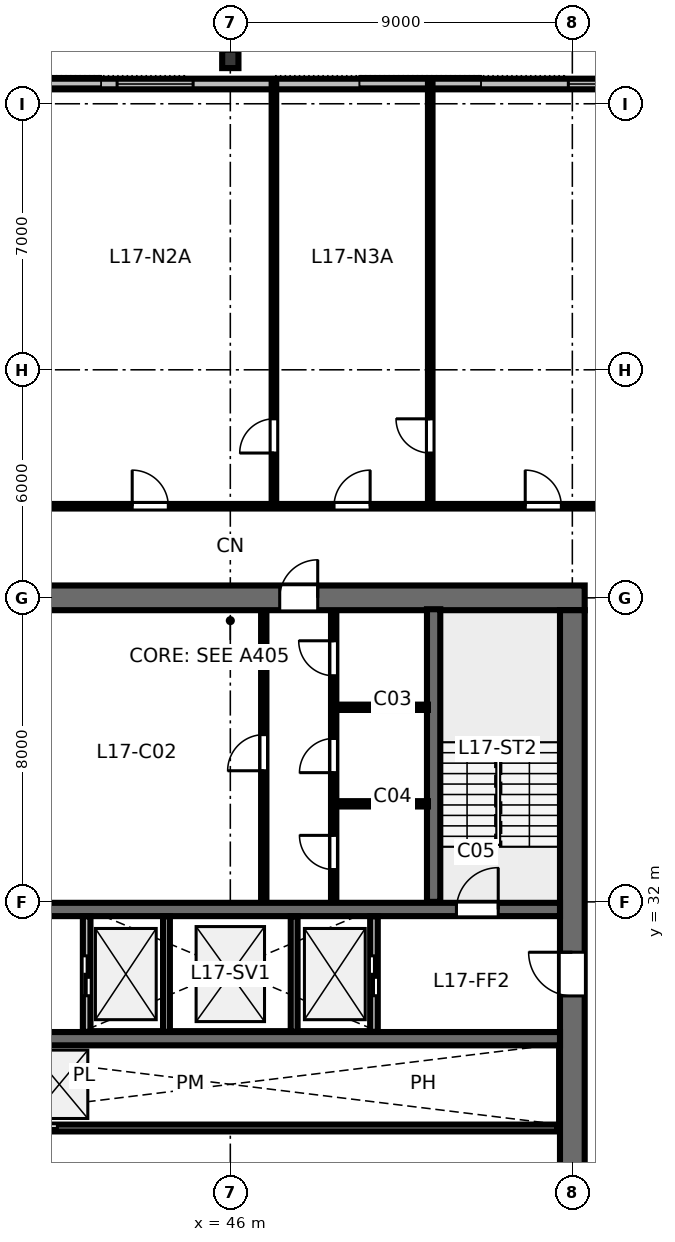
"""IFC4 building model, lengths in metres.
Left out: names, types, materials, properties, quantities, classifications, styles, units other than length and angle.
Written with IfcOpenShell. Run it as: python <this file> out.ifc"""

import sys

from ifc_helpers import new_model, si_unit, direction, frame, frame_2d, origin, origin_2d, place, context, subcontext, project, spatial, rectangle, i_section, extrude, element, fill, save


model = new_model("IFC4")
c1 = context("Model", 3, precision=1e-05, world=origin(), true_north=direction((0.0, 1.0)))
c2 = subcontext(c1, "Body", "Model", "MODEL_VIEW")
j1 = project(units=[si_unit("LENGTHUNIT", "METRE"), si_unit("PLANEANGLEUNIT", "RADIAN")], contexts=[c1])
p1 = place(None, origin())
s1 = spatial("IfcSite", under=j1, at=p1, CompositionType="ELEMENT")
p2 = place(p1, origin())
s2 = spatial("IfcBuilding", under=s1, at=p2, CompositionType="ELEMENT")
p3 = place(p2, frame((0.0, 0.0, 67.6)))
s3 = spatial("IfcBuildingStorey", under=s2, at=p3, CompositionType="ELEMENT", Elevation=67.6)
p4 = place(p3, frame((36.675, 40.0, 0.0), z_axis=(0.0, 0.0, 1.0), x_axis=(1.0, 0.0, 0.0)))
e1 = element("IfcWall", 1, at=p4, inside=s3, PredefinedType="SHEAR", context=c2, shape_type="SweptSolid", body=[
    extrude(rectangle(XDim=18.65, YDim=0.65, at=frame_2d((9.325, 0.0))), origin(), (0.0, 0.0, 1.0), 3.36),
])
p5 = place(p4, frame((10.625, 0.0, 0.0)))
e2 = element("IfcOpeningElement", 2, at=p5, cuts=e1, PredefinedType="OPENING", context=c2, shape_type="SweptSolid", body=[
    extrude(rectangle(XDim=1.0, YDim=2.15, at=frame_2d((0.5, 1.075))), frame((0.0, 0.335, 0.0), z_axis=(0.0, -1.0, 0.0), x_axis=(1.0, 0.0, 0.0)), (0.0, 0.0, 1.0), 0.67),
])
p6 = place(p3, frame((55.0, 24.325, 0.0), z_axis=(0.0, 0.0, 1.0), x_axis=(0.0, 1.0, 0.0)))
e3 = element("IfcWall", 3, at=p6, inside=s3, PredefinedType="SHEAR", context=c2, shape_type="SweptSolid", body=[
    extrude(rectangle(XDim=15.35, YDim=0.65, at=frame_2d((7.675, 0.0))), origin(), (0.0, 0.0, 1.0), 3.36),
])
p7 = place(p6, frame((5.2, 0.0, 0.0)))
e4 = element("IfcOpeningElement", 4, at=p7, cuts=e3, PredefinedType="OPENING", context=c2, shape_type="SweptSolid", body=[
    extrude(rectangle(XDim=1.15, YDim=2.15, at=frame_2d((0.575, 1.075))), frame((0.0, 0.335, 0.0), z_axis=(0.0, -1.0, 0.0), x_axis=(1.0, 0.0, 0.0)), (0.0, 0.0, 1.0), 0.67),
])
p8 = place(p3, frame((37.325, 31.8, 0.0), z_axis=(0.0, 0.0, 1.0), x_axis=(1.0, 0.0, 0.0)))
e5 = element("IfcWall", 5, at=p8, inside=s3, PredefinedType="SHEAR", context=c2, shape_type="SweptSolid", body=[
    extrude(rectangle(XDim=17.35, YDim=0.35, at=frame_2d((8.675, 0.0))), origin(), (0.0, 0.0, 1.0), 3.36),
])
p9 = place(p8, frame((0.725, 0.0, 0.0)))
e6 = element("IfcOpeningElement", 6, at=p9, cuts=e5, PredefinedType="OPENING", context=c2, shape_type="SweptSolid", body=[
    extrude(rectangle(XDim=1.1, YDim=2.15, at=frame_2d((0.55, 1.075))), frame((0.0, 0.185, 0.0), z_axis=(0.0, -1.0, 0.0), x_axis=(1.0, 0.0, 0.0)), (0.0, 0.0, 1.0), 0.37),
])
p10 = place(p8, frame((14.625, 0.0, 0.0)))
e7 = element("IfcOpeningElement", 7, at=p10, cuts=e5, PredefinedType="OPENING", context=c2, shape_type="SweptSolid", body=[
    extrude(rectangle(XDim=1.1, YDim=2.15, at=frame_2d((0.55, 1.075))), frame((0.0, 0.185, 0.0), z_axis=(0.0, -1.0, 0.0), x_axis=(1.0, 0.0, 0.0)), (0.0, 0.0, 1.0), 0.37),
])
p11 = place(p3, frame((37.325, 28.4, 0.0), z_axis=(0.0, 0.0, 1.0), x_axis=(1.0, 0.0, 0.0)))
e8 = element("IfcWall", 8, at=p11, inside=s3, PredefinedType="SHEAR", context=c2, shape_type="SweptSolid", body=[
    extrude(rectangle(XDim=17.35, YDim=0.35, at=frame_2d((8.675, 0.0))), origin(), (0.0, 0.0, 1.0), 3.36),
])
p12 = place(p3, frame((46.0, 54.18, 0.0), z_axis=(0.0, 0.089001216718, 0.996031517284), x_axis=(-1.0, 0.0, 0.0)))
e9 = element("IfcColumn", 9, at=p12, inside=s3, PredefinedType="COLUMN", context=c2, shape_type="SweptSolid", body=[
    extrude(i_section(OverallWidth=0.428, OverallDepth=0.483, WebThickness=0.051, FlangeThickness=0.082, FilletRadius=0.025, at=origin_2d()), origin(), (0.0, 0.0, 1.0), 3.371),
])
p13 = place(p3, frame((66.89, 53.52, 0.0), z_axis=(0.0, 0.0, 1.0), x_axis=(-1.0, 0.0, 0.0)))
e10 = element("IfcWall", 10, at=p13, inside=s3, PredefinedType="STANDARD", context=c2, shape_type="SweptSolid", body=[
    extrude(rectangle(XDim=41.78, YDim=0.28, at=frame_2d((20.89, 0.0))), origin(), (0.0, 0.0, 1.0), 3.36),
])
p14 = place(p13, frame((2.079, 0.0, 0.8)))
e11 = element("IfcOpeningElement", 11, at=p14, cuts=e10, PredefinedType="OPENING", context=c2, shape_type="SweptSolid", body=[
    extrude(rectangle(XDim=2.0, YDim=1.95, at=frame_2d((1.0, 0.975))), frame((0.0, 0.15, 0.0), z_axis=(0.0, -1.0, 0.0), x_axis=(1.0, 0.0, 0.0)), (0.0, 0.0, 1.0), 0.3),
])
p15 = place(p13, frame((6.037, 0.0, 0.8)))
e12 = element("IfcOpeningElement", 12, at=p15, cuts=e10, PredefinedType="OPENING", context=c2, shape_type="SweptSolid", body=[
    extrude(rectangle(XDim=2.0, YDim=1.95, at=frame_2d((1.0, 0.975))), frame((0.0, 0.15, 0.0), z_axis=(0.0, -1.0, 0.0), x_axis=(1.0, 0.0, 0.0)), (0.0, 0.0, 1.0), 0.3),
])
p16 = place(p13, frame((9.995, 0.0, 0.8)))
e13 = element("IfcOpeningElement", 13, at=p16, cuts=e10, PredefinedType="OPENING", context=c2, shape_type="SweptSolid", body=[
    extrude(rectangle(XDim=2.0, YDim=1.95, at=frame_2d((1.0, 0.975))), frame((0.0, 0.15, 0.0), z_axis=(0.0, -1.0, 0.0), x_axis=(1.0, 0.0, 0.0)), (0.0, 0.0, 1.0), 0.3),
])
p17 = place(p13, frame((21.869, 0.0, 0.8)))
e14 = element("IfcOpeningElement", 14, at=p17, cuts=e10, PredefinedType="OPENING", context=c2, shape_type="SweptSolid", body=[
    extrude(rectangle(XDim=2.0, YDim=1.95, at=frame_2d((1.0, 0.975))), frame((0.0, 0.15, 0.0), z_axis=(0.0, -1.0, 0.0), x_axis=(1.0, 0.0, 0.0)), (0.0, 0.0, 1.0), 0.3),
])
p18 = place(p13, frame((29.785, 0.0, 0.8)))
e15 = element("IfcOpeningElement", 15, at=p18, cuts=e10, PredefinedType="OPENING", context=c2, shape_type="SweptSolid", body=[
    extrude(rectangle(XDim=2.0, YDim=1.95, at=frame_2d((1.0, 0.975))), frame((0.0, 0.15, 0.0), z_axis=(0.0, -1.0, 0.0), x_axis=(1.0, 0.0, 0.0)), (0.0, 0.0, 1.0), 0.3),
])
p19 = place(p13, frame((33.743, 0.0, 0.8)))
e16 = element("IfcOpeningElement", 16, at=p19, cuts=e10, PredefinedType="OPENING", context=c2, shape_type="SweptSolid", body=[
    extrude(rectangle(XDim=2.0, YDim=1.95, at=frame_2d((1.0, 0.975))), frame((0.0, 0.15, 0.0), z_axis=(0.0, -1.0, 0.0), x_axis=(1.0, 0.0, 0.0)), (0.0, 0.0, 1.0), 0.3),
])
p20 = place(p13, frame((37.701, 0.0, 0.8)))
e17 = element("IfcOpeningElement", 17, at=p20, cuts=e10, PredefinedType="OPENING", context=c2, shape_type="SweptSolid", body=[
    extrude(rectangle(XDim=2.0, YDim=1.95, at=frame_2d((1.0, 0.975))), frame((0.0, 0.15, 0.0), z_axis=(0.0, -1.0, 0.0), x_axis=(1.0, 0.0, 0.0)), (0.0, 0.0, 1.0), 0.3),
])
p21 = place(p3, frame((51.35, 32.0, 0.0), z_axis=(0.0, 0.0, 1.0), x_axis=(0.0, 1.0, 0.0)))
e18 = element("IfcWall", 18, at=p21, inside=s3, PredefinedType="SHEAR", context=c2, shape_type="SweptSolid", body=[
    extrude(rectangle(XDim=7.7, YDim=0.35, at=frame_2d((3.85, 0.0))), origin(), (0.0, 0.0, 1.0), 3.6),
])
p22 = place(p3, frame((46.88, 32.05, 0.0), z_axis=(0.0, 0.0, 1.0), x_axis=(0.0, 1.0, 0.0)))
e19 = element("IfcWall", 19, at=p22, inside=s3, PredefinedType="PARTITIONING", context=c2, shape_type="SweptSolid", body=[
    extrude(rectangle(XDim=7.6, YDim=0.14, at=frame_2d((3.8, 0.0))), origin(), (0.0, 0.0, 1.0), 3.36),
])
p23 = place(p22, frame((3.4, 0.0, 0.0)))
e20 = element("IfcOpeningElement", 20, at=p23, cuts=e19, PredefinedType="OPENING", context=c2, shape_type="SweptSolid", body=[
    extrude(rectangle(XDim=0.95, YDim=2.15, at=frame_2d((0.475, 1.075))), frame((0.0, 0.08, 0.0), z_axis=(0.0, -1.0, 0.0), x_axis=(1.0, 0.0, 0.0)), (0.0, 0.0, 1.0), 0.16),
])
p24 = place(p3, frame((48.72, 32.05, 0.0), z_axis=(0.0, 0.0, 1.0), x_axis=(0.0, 1.0, 0.0)))
e21 = element("IfcWall", 21, at=p24, inside=s3, PredefinedType="PARTITIONING", context=c2, shape_type="SweptSolid", body=[
    extrude(rectangle(XDim=7.6, YDim=0.14, at=frame_2d((3.8, 0.0))), origin(), (0.0, 0.0, 1.0), 3.36),
])
p25 = place(p24, frame((0.8, 0.0, 0.0)))
e22 = element("IfcOpeningElement", 22, at=p25, cuts=e21, PredefinedType="OPENING", context=c2, shape_type="SweptSolid", body=[
    extrude(rectangle(XDim=0.9, YDim=2.15, at=frame_2d((0.45, 1.075))), frame((0.0, 0.08, 0.0), z_axis=(0.0, -1.0, 0.0), x_axis=(1.0, 0.0, 0.0)), (0.0, 0.0, 1.0), 0.16),
])
p26 = place(p24, frame((3.35, 0.0, 0.0)))
e23 = element("IfcOpeningElement", 23, at=p26, cuts=e21, PredefinedType="OPENING", context=c2, shape_type="SweptSolid", body=[
    extrude(rectangle(XDim=0.9, YDim=2.15, at=frame_2d((0.45, 1.075))), frame((0.0, 0.08, 0.0), z_axis=(0.0, -1.0, 0.0), x_axis=(1.0, 0.0, 0.0)), (0.0, 0.0, 1.0), 0.16),
])
p27 = place(p24, frame((5.9, 0.0, 0.0)))
e24 = element("IfcOpeningElement", 24, at=p27, cuts=e21, PredefinedType="OPENING", context=c2, shape_type="SweptSolid", body=[
    extrude(rectangle(XDim=0.92, YDim=2.15, at=frame_2d((0.46, 1.075))), frame((0.0, 0.08, 0.0), z_axis=(0.0, -1.0, 0.0), x_axis=(1.0, 0.0, 0.0)), (0.0, 0.0, 1.0), 0.16),
])
for number, where, z_axis, x_axis in (
    (25, (48.8, 34.58, 0.0), (0.0, 0.0, 1.0), (1.0, 0.0, 0.0)),
    (26, (48.8, 37.12, 0.0), (0.0, 0.0, 1.0), (1.0, 0.0, 0.0)),
):
    element("IfcWall", number, at=place(p3, frame(where, z_axis=z_axis, x_axis=x_axis)), inside=s3, PredefinedType="PARTITIONING", context=c2, shape_type="SweptSolid", body=[
        extrude(rectangle(XDim=2.4, YDim=0.14, at=frame_2d((1.2, 0.0))), origin(), (0.0, 0.0, 1.0), 3.36),
    ])
p28 = place(p3, frame((42.22, 28.58, 0.0), z_axis=(0.0, 0.0, 1.0), x_axis=(0.0, 1.0, 0.0)))
e27 = element("IfcWall", 27, at=p28, inside=s3, PredefinedType="PARTITIONING", context=c2, shape_type="SweptSolid", body=[
    extrude(rectangle(XDim=3.04, YDim=0.2, at=frame_2d((1.52, 0.0))), origin(), (0.0, 0.0, 1.0), 3.36),
])
p29 = place(p28, frame((0.95, 0.0, 0.0)))
e28 = element("IfcOpeningElement", 28, at=p29, cuts=e27, PredefinedType="OPENING", context=c2, shape_type="SweptSolid", body=[
    extrude(rectangle(XDim=1.05, YDim=2.15, at=frame_2d((0.525, 1.075))), frame((0.0, 0.11, 0.0), z_axis=(0.0, -1.0, 0.0), x_axis=(1.0, 0.0, 0.0)), (0.0, 0.0, 1.0), 0.22),
])
p30 = place(p3, frame((49.78, 28.58, 0.0), z_axis=(0.0, 0.0, 1.0), x_axis=(0.0, 1.0, 0.0)))
e29 = element("IfcWall", 29, at=p30, inside=s3, PredefinedType="PARTITIONING", context=c2, shape_type="SweptSolid", body=[
    extrude(rectangle(XDim=3.04, YDim=0.2, at=frame_2d((1.52, 0.0))), origin(), (0.0, 0.0, 1.0), 3.36),
])
p31 = place(p30, frame((0.95, 0.0, 0.0)))
e30 = element("IfcOpeningElement", 30, at=p31, cuts=e29, PredefinedType="OPENING", context=c2, shape_type="SweptSolid", body=[
    extrude(rectangle(XDim=1.05, YDim=2.15, at=frame_2d((0.525, 1.075))), frame((0.0, 0.11, 0.0), z_axis=(0.0, -1.0, 0.0), x_axis=(1.0, 0.0, 0.0)), (0.0, 0.0, 1.0), 0.22),
])
for number, where, z_axis, x_axis in (
    (31, (44.32, 28.58, 0.0), (0.0, 0.0, 1.0), (0.0, 1.0, 0.0)),
    (32, (47.68, 28.58, 0.0), (0.0, 0.0, 1.0), (0.0, 1.0, 0.0)),
):
    element("IfcWall", number, at=place(p3, frame(where, z_axis=z_axis, x_axis=x_axis)), inside=s3, PredefinedType="PARTITIONING", context=c2, shape_type="SweptSolid", body=[
        extrude(rectangle(XDim=3.04, YDim=0.18, at=frame_2d((1.52, 0.0))), origin(), (0.0, 0.0, 1.0), 3.36),
    ])
p32 = place(p3, frame((37.4, 26.05, 0.0), z_axis=(0.0, 0.0, 1.0), x_axis=(1.0, 0.0, 0.0)))
e33 = element("IfcWall", 33, at=p32, inside=s3, PredefinedType="PARTITIONING", context=c2, shape_type="SweptSolid", body=[
    extrude(rectangle(XDim=17.2, YDim=0.18, at=frame_2d((8.6, 0.0))), origin(), (0.0, 0.0, 1.0), 3.36),
])
p33 = place(p32, frame((1.1, 0.0, 0.0)))
e34 = element("IfcOpeningElement", 34, at=p33, cuts=e33, PredefinedType="OPENING", context=c2, shape_type="SweptSolid", body=[
    extrude(rectangle(XDim=1.05, YDim=2.15, at=frame_2d((0.525, 1.075))), frame((0.0, 0.1, 0.0), z_axis=(0.0, -1.0, 0.0), x_axis=(1.0, 0.0, 0.0)), (0.0, 0.0, 1.0), 0.2),
])
p34 = place(p32, frame((3.0, 0.0, 0.0)))
e35 = element("IfcOpeningElement", 35, at=p34, cuts=e33, PredefinedType="OPENING", context=c2, shape_type="SweptSolid", body=[
    extrude(rectangle(XDim=1.05, YDim=2.15, at=frame_2d((0.525, 1.075))), frame((0.0, 0.1, 0.0), z_axis=(0.0, -1.0, 0.0), x_axis=(1.0, 0.0, 0.0)), (0.0, 0.0, 1.0), 0.2),
])
p35 = place(p3, frame((47.148, 42.41, 0.0), z_axis=(0.0, 0.0, 1.0), x_axis=(0.0, 1.0, 0.0)))
e36 = element("IfcWall", 36, at=p35, inside=s3, PredefinedType="PARTITIONING", context=c2, shape_type="SweptSolid", body=[
    extrude(rectangle(XDim=11.11, YDim=0.12, at=frame_2d((5.555, 0.0))), origin(), (0.0, 0.0, 1.0), 2.64),
])
p36 = place(p35, frame((1.4, 0.0, 0.0)))
e37 = element("IfcOpeningElement", 37, at=p36, cuts=e36, PredefinedType="OPENING", context=c2, shape_type="SweptSolid", body=[
    extrude(rectangle(XDim=0.9, YDim=2.15, at=frame_2d((0.45, 1.075))), frame((0.0, 0.07, 0.0), z_axis=(0.0, -1.0, 0.0), x_axis=(1.0, 0.0, 0.0)), (0.0, 0.0, 1.0), 0.14),
])
p37 = place(p3, frame((51.261, 42.41, 0.0), z_axis=(0.0, 0.0, 1.0), x_axis=(0.0, 1.0, 0.0)))
e38 = element("IfcWall", 38, at=p37, inside=s3, PredefinedType="PARTITIONING", context=c2, shape_type="SweptSolid", body=[
    extrude(rectangle(XDim=11.11, YDim=0.12, at=frame_2d((5.555, 0.0))), origin(), (0.0, 0.0, 1.0), 2.64),
])
p38 = place(p37, frame((1.4, 0.0, 0.0)))
e39 = element("IfcOpeningElement", 39, at=p38, cuts=e38, PredefinedType="OPENING", context=c2, shape_type="SweptSolid", body=[
    extrude(rectangle(XDim=0.9, YDim=2.15, at=frame_2d((0.45, 1.075))), frame((0.0, 0.07, 0.0), z_axis=(0.0, -1.0, 0.0), x_axis=(1.0, 0.0, 0.0)), (0.0, 0.0, 1.0), 0.14),
])
p39 = place(p3, frame((34.65, 42.41, 0.0), z_axis=(0.0, 0.0, 1.0), x_axis=(1.0, 0.0, 0.0)))
e40 = element("IfcWall", 40, at=p39, inside=s3, PredefinedType="PARTITIONING", context=c2, shape_type="SweptSolid", body=[
    extrude(rectangle(XDim=22.7, YDim=0.12, at=frame_2d((11.35, 0.0))), origin(), (0.0, 0.0, 1.0), 2.64),
])
p40 = place(p39, frame((2.59, 0.0, 0.0)))
e41 = element("IfcOpeningElement", 41, at=p40, cuts=e40, PredefinedType="OPENING", context=c2, shape_type="SweptSolid", body=[
    extrude(rectangle(XDim=0.95, YDim=2.15, at=frame_2d((0.475, 1.075))), frame((0.0, 0.07, 0.0), z_axis=(0.0, -1.0, 0.0), x_axis=(1.0, 0.0, 0.0)), (0.0, 0.0, 1.0), 0.14),
])
p41 = place(p39, frame((8.768, 0.0, 0.0)))
e42 = element("IfcOpeningElement", 42, at=p41, cuts=e40, PredefinedType="OPENING", context=c2, shape_type="SweptSolid", body=[
    extrude(rectangle(XDim=0.95, YDim=2.15, at=frame_2d((0.475, 1.075))), frame((0.0, 0.07, 0.0), z_axis=(0.0, -1.0, 0.0), x_axis=(1.0, 0.0, 0.0)), (0.0, 0.0, 1.0), 0.14),
])
p42 = place(p39, frame((14.079, 0.0, 0.0)))
e43 = element("IfcOpeningElement", 43, at=p42, cuts=e40, PredefinedType="OPENING", context=c2, shape_type="SweptSolid", body=[
    extrude(rectangle(XDim=0.95, YDim=2.15, at=frame_2d((0.475, 1.075))), frame((0.0, 0.07, 0.0), z_axis=(0.0, -1.0, 0.0), x_axis=(1.0, 0.0, 0.0)), (0.0, 0.0, 1.0), 0.14),
])
p43 = place(p39, frame((19.11, 0.0, 0.0)))
e44 = element("IfcOpeningElement", 44, at=p43, cuts=e40, PredefinedType="OPENING", context=c2, shape_type="SweptSolid", body=[
    extrude(rectangle(XDim=0.95, YDim=2.15, at=frame_2d((0.475, 1.075))), frame((0.0, 0.07, 0.0), z_axis=(0.0, -1.0, 0.0), x_axis=(1.0, 0.0, 0.0)), (0.0, 0.0, 1.0), 0.14),
])
p44 = place(p16, origin())
e45 = element("IfcWindow", 45, at=p44, inside=s3, PartitioningType="SINGLE_PANEL", PredefinedType="WINDOW", context=c2, shape_type="SweptSolid", body=[
    extrude(rectangle(XDim=2.0, YDim=1.95, at=frame_2d((1.0, 0.975))), frame((0.0, 0.03, 0.0), z_axis=(0.0, -1.0, 0.0), x_axis=(1.0, 0.0, 0.0)), (0.0, 0.0, 1.0), 0.06),
])
fill(e13, e45)
p45 = place(p17, origin())
e46 = element("IfcWindow", 46, at=p45, inside=s3, PartitioningType="SINGLE_PANEL", PredefinedType="WINDOW", context=c2, shape_type="SweptSolid", body=[
    extrude(rectangle(XDim=2.0, YDim=1.95, at=frame_2d((1.0, 0.975))), frame((0.0, 0.03, 0.0), z_axis=(0.0, -1.0, 0.0), x_axis=(1.0, 0.0, 0.0)), (0.0, 0.0, 1.0), 0.06),
])
fill(e14, e46)
p46 = place(p10, origin())
e47 = element("IfcDoor", 47, at=p46, inside=s3, OperationType="SINGLE_SWING_RIGHT", PredefinedType="DOOR", context=c2, shape_type="SweptSolid", body=[
    extrude(rectangle(XDim=1.1, YDim=2.15, at=frame_2d((0.55, 1.075))), frame((0.0, 0.025, 0.0), z_axis=(0.0, -1.0, 0.0), x_axis=(1.0, 0.0, 0.0)), (0.0, 0.0, 1.0), 0.05),
])
fill(e7, e47)
p47 = place(p5, origin())
e48 = element("IfcDoor", 48, at=p47, inside=s3, OperationType="SINGLE_SWING_RIGHT", PredefinedType="DOOR", context=c2, shape_type="SweptSolid", body=[
    extrude(rectangle(XDim=1.0, YDim=2.15, at=frame_2d((0.5, 1.075))), frame((0.0, 0.025, 0.0), z_axis=(0.0, -1.0, 0.0), x_axis=(1.0, 0.0, 0.0)), (0.0, 0.0, 1.0), 0.05),
])
fill(e2, e48)
p48 = place(p7, origin())
e49 = element("IfcDoor", 49, at=p48, inside=s3, OperationType="SINGLE_SWING_RIGHT", PredefinedType="DOOR", context=c2, shape_type="SweptSolid", body=[
    extrude(rectangle(XDim=1.15, YDim=2.15, at=frame_2d((0.575, 1.075))), frame((0.0, 0.025, 0.0), z_axis=(0.0, -1.0, 0.0), x_axis=(1.0, 0.0, 0.0)), (0.0, 0.0, 1.0), 0.05),
])
fill(e4, e49)
p49 = place(p23, origin())
e50 = element("IfcDoor", 50, at=p49, inside=s3, OperationType="SINGLE_SWING_LEFT", PredefinedType="DOOR", context=c2, shape_type="SweptSolid", body=[
    extrude(rectangle(XDim=0.95, YDim=2.15, at=frame_2d((0.475, 1.075))), frame((0.0, 0.025, 0.0), z_axis=(0.0, -1.0, 0.0), x_axis=(1.0, 0.0, 0.0)), (0.0, 0.0, 1.0), 0.05),
])
fill(e20, e50)
p50 = place(p25, origin())
e51 = element("IfcDoor", 51, at=p50, inside=s3, OperationType="SINGLE_SWING_RIGHT", PredefinedType="DOOR", context=c2, shape_type="SweptSolid", body=[
    extrude(rectangle(XDim=0.9, YDim=2.15, at=frame_2d((0.45, 1.075))), frame((0.0, 0.025, 0.0), z_axis=(0.0, -1.0, 0.0), x_axis=(1.0, 0.0, 0.0)), (0.0, 0.0, 1.0), 0.05),
])
fill(e22, e51)
p51 = place(p26, origin())
e52 = element("IfcDoor", 52, at=p51, inside=s3, OperationType="SINGLE_SWING_LEFT", PredefinedType="DOOR", context=c2, shape_type="SweptSolid", body=[
    extrude(rectangle(XDim=0.9, YDim=2.15, at=frame_2d((0.45, 1.075))), frame((0.0, 0.025, 0.0), z_axis=(0.0, -1.0, 0.0), x_axis=(1.0, 0.0, 0.0)), (0.0, 0.0, 1.0), 0.05),
])
fill(e23, e52)
p52 = place(p27, origin())
e53 = element("IfcDoor", 53, at=p52, inside=s3, OperationType="SINGLE_SWING_RIGHT", PredefinedType="DOOR", context=c2, shape_type="SweptSolid", body=[
    extrude(rectangle(XDim=0.92, YDim=2.15, at=frame_2d((0.46, 1.075))), frame((0.0, 0.025, 0.0), z_axis=(0.0, -1.0, 0.0), x_axis=(1.0, 0.0, 0.0)), (0.0, 0.0, 1.0), 0.05),
])
fill(e24, e53)
p53 = place(p29, origin())
e54 = element("IfcDoor", 54, at=p53, inside=s3, OperationType="SLIDING_TO_LEFT", PredefinedType="DOOR", context=c2, shape_type="SweptSolid", body=[
    extrude(rectangle(XDim=1.05, YDim=2.15, at=frame_2d((0.525, 1.075))), frame((0.0, 0.025, 0.0), z_axis=(0.0, -1.0, 0.0), x_axis=(1.0, 0.0, 0.0)), (0.0, 0.0, 1.0), 0.05),
])
fill(e28, e54)
p54 = place(p31, origin())
e55 = element("IfcDoor", 55, at=p54, inside=s3, OperationType="SLIDING_TO_RIGHT", PredefinedType="DOOR", context=c2, shape_type="SweptSolid", body=[
    extrude(rectangle(XDim=1.05, YDim=2.15, at=frame_2d((0.525, 1.075))), frame((0.0, 0.025, 0.0), z_axis=(0.0, -1.0, 0.0), x_axis=(1.0, 0.0, 0.0)), (0.0, 0.0, 1.0), 0.05),
])
fill(e30, e55)
p55 = place(p34, origin())
e56 = element("IfcDoor", 56, at=p55, inside=s3, OperationType="SLIDING_TO_RIGHT", PredefinedType="DOOR", context=c2, shape_type="SweptSolid", body=[
    extrude(rectangle(XDim=1.05, YDim=2.15, at=frame_2d((0.525, 1.075))), frame((0.0, 0.025, 0.0), z_axis=(0.0, -1.0, 0.0), x_axis=(1.0, 0.0, 0.0)), (0.0, 0.0, 1.0), 0.05),
])
fill(e35, e56)
p56 = place(p36, origin())
e57 = element("IfcDoor", 57, at=p56, inside=s3, OperationType="SINGLE_SWING_LEFT", PredefinedType="DOOR", context=c2, shape_type="SweptSolid", body=[
    extrude(rectangle(XDim=0.9, YDim=2.15, at=frame_2d((0.45, 1.075))), frame((0.0, 0.025, 0.0), z_axis=(0.0, -1.0, 0.0), x_axis=(1.0, 0.0, 0.0)), (0.0, 0.0, 1.0), 0.05),
])
fill(e37, e57)
p57 = place(p38, origin())
e58 = element("IfcDoor", 58, at=p57, inside=s3, OperationType="SINGLE_SWING_RIGHT", PredefinedType="DOOR", context=c2, shape_type="SweptSolid", body=[
    extrude(rectangle(XDim=0.9, YDim=2.15, at=frame_2d((0.45, 1.075))), frame((0.0, 0.025, 0.0), z_axis=(0.0, -1.0, 0.0), x_axis=(1.0, 0.0, 0.0)), (0.0, 0.0, 1.0), 0.05),
])
fill(e39, e58)
p58 = place(p41, origin())
e59 = element("IfcDoor", 59, at=p58, inside=s3, OperationType="SINGLE_SWING_LEFT", PredefinedType="DOOR", context=c2, shape_type="SweptSolid", body=[
    extrude(rectangle(XDim=0.95, YDim=2.15, at=frame_2d((0.475, 1.075))), frame((0.0, 0.025, 0.0), z_axis=(0.0, -1.0, 0.0), x_axis=(1.0, 0.0, 0.0)), (0.0, 0.0, 1.0), 0.05),
])
fill(e42, e59)
p59 = place(p42, origin())
e60 = element("IfcDoor", 60, at=p59, inside=s3, OperationType="SINGLE_SWING_RIGHT", PredefinedType="DOOR", context=c2, shape_type="SweptSolid", body=[
    extrude(rectangle(XDim=0.95, YDim=2.15, at=frame_2d((0.475, 1.075))), frame((0.0, 0.025, 0.0), z_axis=(0.0, -1.0, 0.0), x_axis=(1.0, 0.0, 0.0)), (0.0, 0.0, 1.0), 0.05),
])
fill(e43, e60)
p60 = place(p43, origin())
e61 = element("IfcDoor", 61, at=p60, inside=s3, OperationType="SINGLE_SWING_LEFT", PredefinedType="DOOR", context=c2, shape_type="SweptSolid", body=[
    extrude(rectangle(XDim=0.95, YDim=2.15, at=frame_2d((0.475, 1.075))), frame((0.0, 0.025, 0.0), z_axis=(0.0, -1.0, 0.0), x_axis=(1.0, 0.0, 0.0)), (0.0, 0.0, 1.0), 0.05),
])
fill(e44, e61)
save(model, sys.argv[1])
